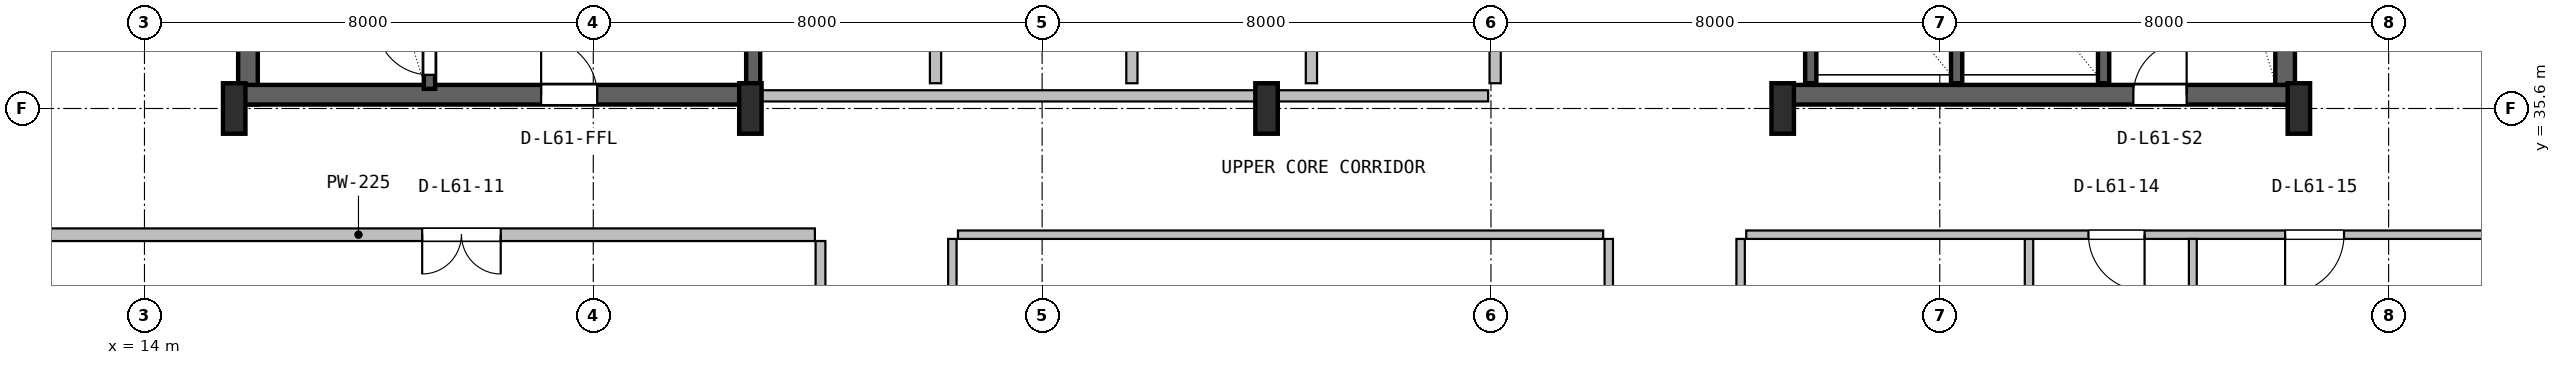
"""IFC4 building model, lengths in metres.
Left out: names, types, materials, properties, quantities, classifications, styles, units other than length and angle.
Written with IfcOpenShell. Run it as: python <this file> out.ifc"""

import sys

from ifc_helpers import new_model, si_unit, direction, frame, frame_2d, origin, origin_2d, place, context, subcontext, project, spatial, rectangle, i_section, extrude, source, transform, mapped, element, fill, save


model = new_model("IFC4")
c1 = context("Model", 3, precision=1e-05, world=origin(), true_north=direction((0.0, 1.0)))
c2 = subcontext(c1, "Body", "Model", "MODEL_VIEW")
j1 = project(units=[si_unit("LENGTHUNIT", "METRE"), si_unit("PLANEANGLEUNIT", "RADIAN")], contexts=[c1])
p1 = place(None, origin())
s1 = spatial("IfcSite", under=j1, at=p1, CompositionType="ELEMENT")
p2 = place(p1, origin())
s2 = spatial("IfcBuilding", under=s1, at=p2, CompositionType="ELEMENT")
p3 = place(p2, frame((0.0, 0.0, 247.0)))
s3 = spatial("IfcBuildingStorey", under=s2, at=p3, CompositionType="ELEMENT", Elevation=247.0)
for number, where, z_axis, x_axis in (
    (1, (15.845, 35.67, 0.0), (0.0, 0.0, 1.0), (0.0, 1.0, 0.0)),
    (2, (52.155, 35.67, 0.0), (0.0, 0.0, 1.0), (0.0, 1.0, 0.0)),
):
    element("IfcWall", number, at=place(p3, frame(where, z_axis=z_axis, x_axis=x_axis)), inside=s3, PredefinedType="SHEAR", context=c2, shape_type="SweptSolid", body=[
        extrude(rectangle(XDim=11.13, YDim=0.35, at=frame_2d((5.565, 0.0))), origin(), (0.0, 0.0, 1.0), 3.55),
    ])
p4 = place(p3, frame((15.67, 35.845, 0.0), z_axis=(0.0, 0.0, 1.0), x_axis=(1.0, 0.0, 0.0)))
e3 = element("IfcWall", 3, at=p4, inside=s3, PredefinedType="SHEAR", context=c2, shape_type="SweptSolid", body=[
    extrude(rectangle(XDim=9.13, YDim=0.35, at=frame_2d((4.565, 0.0))), origin(), (0.0, 0.0, 1.0), 3.55),
])
p5 = place(p4, frame((5.4, 0.0, 0.0)))
e4 = element("IfcOpeningElement", 4, at=p5, cuts=e3, PredefinedType="OPENING", context=c2, shape_type="SweptSolid", body=[
    extrude(rectangle(XDim=1.0, YDim=2.1, at=frame_2d((0.5, 1.05))), frame((0.0, 0.185, 0.0), z_axis=(0.0, -1.0, 0.0), x_axis=(1.0, 0.0, 0.0)), (0.0, 0.0, 1.0), 0.37),
])
p6 = place(p3, frame((43.2, 35.845, 0.0), z_axis=(0.0, 0.0, 1.0), x_axis=(1.0, 0.0, 0.0)))
e5 = element("IfcWall", 5, at=p6, inside=s3, PredefinedType="SHEAR", context=c2, shape_type="SweptSolid", body=[
    extrude(rectangle(XDim=9.13, YDim=0.35, at=frame_2d((4.565, 0.0))), origin(), (0.0, 0.0, 1.0), 3.55),
])
p7 = place(p6, frame((6.25, 0.0, 0.0)))
e6 = element("IfcOpeningElement", 6, at=p7, cuts=e5, PredefinedType="OPENING", context=c2, shape_type="SweptSolid", body=[
    extrude(rectangle(XDim=0.95, YDim=2.1, at=frame_2d((0.475, 1.05))), frame((0.0, 0.185, 0.0), z_axis=(0.0, -1.0, 0.0), x_axis=(1.0, 0.0, 0.0)), (0.0, 0.0, 1.0), 0.37),
])
m1 = source(origin(), c2, "Body", "SweptSolid", [
    extrude(i_section(OverallWidth=0.4, OverallDepth=0.9, WebThickness=0.016, FlangeThickness=0.028, FilletRadius=0.016, at=origin_2d()), origin(), (0.0, 0.0, 1.0), 3.8),
])
for number, where, z_axis, x_axis in (
    (7, (15.6, 35.6, 0.0), (0.0, 0.0, 1.0), (1.0, 0.0, 0.0)),
    (8, (24.8, 35.6, 0.0), (0.0, 0.0, 1.0), (1.0, 0.0, 0.0)),
    (9, (34.0, 35.6, 0.0), (0.0, 0.0, 1.0), (1.0, 0.0, 0.0)),
    (10, (43.2, 35.6, 0.0), (0.0, 0.0, 1.0), (1.0, 0.0, 0.0)),
    (11, (52.4, 35.6, 0.0), (0.0, 0.0, 1.0), (1.0, 0.0, 0.0)),
):
    element("IfcColumn", number, at=place(p3, frame(where, z_axis=z_axis, x_axis=x_axis)), inside=s3, PredefinedType="COLUMN", context=c2, shape_type="MappedRepresentation", body=[
        mapped(m1, transform((0.0, 0.0, 0.0), x_axis=(1.0, 0.0, 0.0), y_axis=(0.0, 1.0, 0.0), z_axis=(0.0, 0.0, 1.0), scale=1.0)),
    ])
p8 = place(p3, frame((19.08, 35.95, 0.0), z_axis=(0.0, 0.0, 1.0), x_axis=(0.0, 1.0, 0.0)))
e12 = element("IfcWall", 12, at=p8, inside=s3, PredefinedType="SHEAR", context=c2, shape_type="SweptSolid", body=[
    extrude(rectangle(XDim=9.65, YDim=0.2, at=frame_2d((4.825, 0.0))), origin(), (0.0, 0.0, 1.0), 3.55),
])
p9 = place(p8, frame((0.25, 0.0, 0.0)))
e13 = element("IfcOpeningElement", 13, at=p9, cuts=e12, PredefinedType="OPENING", context=c2, shape_type="SweptSolid", body=[
    extrude(rectangle(XDim=0.95, YDim=2.1, at=frame_2d((0.475, 1.05))), frame((0.0, 0.11, 0.0), z_axis=(0.0, -1.0, 0.0), x_axis=(1.0, 0.0, 0.0)), (0.0, 0.0, 1.0), 0.22),
])
p10 = place(p3, frame((24.85, 36.05, 0.0), z_axis=(0.0, 0.0, 1.0), x_axis=(0.0, 1.0, 0.0)))
e14 = element("IfcWall", 14, at=p10, inside=s3, PredefinedType="SHEAR", context=c2, shape_type="SweptSolid", body=[
    extrude(rectangle(XDim=10.45, YDim=0.25, at=frame_2d((5.225, 0.0))), origin(), (0.0, 0.0, 1.0), 3.55),
])
p11 = place(p3, frame((48.92, 36.05, 0.0), z_axis=(0.0, 0.0, 1.0), x_axis=(0.0, 1.0, 0.0)))
e15 = element("IfcWall", 15, at=p11, inside=s3, PredefinedType="SHEAR", context=c2, shape_type="SweptSolid", body=[
    extrude(rectangle(XDim=10.5, YDim=0.2, at=frame_2d((5.25, 0.0))), origin(), (0.0, 0.0, 1.0), 3.55),
])
for number, where, z_axis, x_axis in (
    (16, (43.7, 36.05, 0.0), (0.0, 0.0, 1.0), (0.0, 1.0, 0.0)),
    (17, (46.3, 36.05, 0.0), (0.0, 0.0, 1.0), (0.0, 1.0, 0.0)),
):
    element("IfcWall", number, at=place(p3, frame(where, z_axis=z_axis, x_axis=x_axis)), inside=s3, PredefinedType="SHEAR", context=c2, shape_type="SweptSolid", body=[
        extrude(rectangle(XDim=3.05, YDim=0.2, at=frame_2d((1.525, 0.0))), origin(), (0.0, 0.0, 1.0), 3.55),
    ])
p12 = place(p3, frame((25.0, 35.825, 0.0), z_axis=(0.0, 0.0, 1.0), x_axis=(1.0, 0.0, 0.0)))
e18 = element("IfcWall", 18, at=p12, inside=s3, PredefinedType="SOLIDWALL", context=c2, shape_type="SweptSolid", body=[
    extrude(rectangle(XDim=12.95, YDim=0.2, at=frame_2d((6.475, 0.0))), origin(), (0.0, 0.0, 1.0), 2.575),
])
for number, where, z_axis, x_axis in (
    (19, (28.1, 36.05, 0.0), (0.0, 0.0, 1.0), (0.0, 1.0, 0.0)),
    (20, (31.6, 36.05, 0.0), (0.0, 0.0, 1.0), (0.0, 1.0, 0.0)),
):
    element("IfcWall", number, at=place(p3, frame(where, z_axis=z_axis, x_axis=x_axis)), inside=s3, PredefinedType="PLUMBINGWALL", context=c2, shape_type="SweptSolid", body=[
        extrude(rectangle(XDim=3.1, YDim=0.2, at=frame_2d((1.55, 0.0))), origin(), (0.0, 0.0, 1.0), 3.53),
    ])
for number, where, z_axis, x_axis in (
    (21, (34.8, 36.05, 0.0), (0.0, 0.0, 1.0), (0.0, 1.0, 0.0)),
    (22, (38.075, 36.05, 0.0), (0.0, 0.0, 1.0), (0.0, 1.0, 0.0)),
):
    element("IfcWall", number, at=place(p3, frame(where, z_axis=z_axis, x_axis=x_axis)), inside=s3, PredefinedType="SOLIDWALL", context=c2, shape_type="SweptSolid", body=[
        extrude(rectangle(XDim=3.1, YDim=0.2, at=frame_2d((1.55, 0.0))), origin(), (0.0, 0.0, 1.0), 3.53),
    ])
p13 = place(p3, frame((26.05, 22.235, 0.0), z_axis=(0.0, 0.0, 1.0), x_axis=(0.0, 1.0, 0.0)))
e23 = element("IfcWall", 23, at=p13, inside=s3, PredefinedType="PARTITIONING", context=c2, shape_type="SweptSolid", body=[
    extrude(rectangle(XDim=11.003, YDim=0.175, at=frame_2d((5.501, 0.0))), origin(), (0.0, 0.0, 1.0), 2.908),
])
p14 = place(p13, frame((0.3, 0.0, 0.0)))
e24 = element("IfcOpeningElement", 24, at=p14, cuts=e23, PredefinedType="OPENING", context=c2, shape_type="SweptSolid", body=[
    extrude(rectangle(XDim=1.05, YDim=2.1, at=frame_2d((0.525, 1.05))), frame((0.0, 0.098, 0.0), z_axis=(0.0, -1.0, 0.0), x_axis=(1.0, 0.0, 0.0)), (0.0, 0.0, 1.0), 0.195),
])
p15 = place(p13, frame((3.91, 0.0, 0.0)))
e25 = element("IfcOpeningElement", 25, at=p15, cuts=e23, PredefinedType="OPENING", context=c2, shape_type="SweptSolid", body=[
    extrude(rectangle(XDim=1.05, YDim=2.1, at=frame_2d((0.525, 1.05))), frame((0.0, 0.098, 0.0), z_axis=(0.0, -1.0, 0.0), x_axis=(1.0, 0.0, 0.0)), (0.0, 0.0, 1.0), 0.195),
])
p16 = place(p3, frame((9.68, 33.35, 0.0), z_axis=(0.0, 0.0, 1.0), x_axis=(1.0, 0.0, 0.0)))
e26 = element("IfcWall", 26, at=p16, inside=s3, PredefinedType="PARTITIONING", context=c2, shape_type="SweptSolid", body=[
    extrude(rectangle(XDim=16.27, YDim=0.225, at=frame_2d((8.135, 0.0))), origin(), (0.0, 0.0, 1.0), 2.908),
])
p17 = place(p16, frame((9.27, 0.0, 0.0)))
e27 = element("IfcOpeningElement", 27, at=p17, cuts=e26, PredefinedType="OPENING", context=c2, shape_type="SweptSolid", body=[
    extrude(rectangle(XDim=1.4, YDim=2.12, at=frame_2d((0.7, 1.06))), frame((0.0, 0.123, 0.0), z_axis=(0.0, -1.0, 0.0), x_axis=(1.0, 0.0, 0.0)), (0.0, 0.0, 1.0), 0.245),
])
p18 = place(p3, frame((40.1, 24.585, 0.0), z_axis=(0.0, 0.0, 1.0), x_axis=(0.0, 1.0, 0.0)))
e28 = element("IfcWall", 28, at=p18, inside=s3, PredefinedType="PARTITIONING", context=c2, shape_type="SweptSolid", body=[
    extrude(rectangle(XDim=8.69, YDim=0.15, at=frame_2d((4.345, 0.0))), origin(), (0.0, 0.0, 1.0), 3.222),
])
p19 = place(p3, frame((28.5, 33.35, 0.0), z_axis=(0.0, 0.0, 1.0), x_axis=(1.0, 0.0, 0.0)))
e29 = element("IfcWall", 29, at=p19, inside=s3, PredefinedType="PARTITIONING", context=c2, shape_type="SweptSolid", body=[
    extrude(rectangle(XDim=11.5, YDim=0.15, at=frame_2d((5.75, 0.0))), origin(), (0.0, 0.0, 1.0), 2.908),
])
p20 = place(p3, frame((28.4, 24.585, 0.0), z_axis=(0.0, 0.0, 1.0), x_axis=(0.0, 1.0, 0.0)))
e30 = element("IfcWall", 30, at=p20, inside=s3, PredefinedType="PARTITIONING", context=c2, shape_type="SweptSolid", body=[
    extrude(rectangle(XDim=8.69, YDim=0.15, at=frame_2d((4.345, 0.0))), origin(), (0.0, 0.0, 1.0), 3.222),
])
p21 = place(p3, frame((47.59, 22.235, 0.0), z_axis=(0.0, 0.0, 1.0), x_axis=(0.0, 1.0, 0.0)))
e31 = element("IfcWall", 31, at=p21, inside=s3, PredefinedType="PARTITIONING", context=c2, shape_type="SweptSolid", body=[
    extrude(rectangle(XDim=11.04, YDim=0.15, at=frame_2d((5.52, 0.0))), origin(), (0.0, 0.0, 1.0), 3.222),
])
p22 = place(p3, frame((42.55, 33.35, 0.0), z_axis=(0.0, 0.0, 1.0), x_axis=(1.0, 0.0, 0.0)))
e32 = element("IfcWall", 32, at=p22, inside=s3, PredefinedType="PARTITIONING", context=c2, shape_type="SweptSolid", body=[
    extrude(rectangle(XDim=15.77, YDim=0.15, at=frame_2d((7.885, 0.0))), origin(), (0.0, 0.0, 1.0), 2.908),
])
p23 = place(p22, frame((6.1, 0.0, 0.0)))
e33 = element("IfcOpeningElement", 33, at=p23, cuts=e32, PredefinedType="OPENING", context=c2, shape_type="SweptSolid", body=[
    extrude(rectangle(XDim=1.0, YDim=2.1, at=frame_2d((0.5, 1.05))), frame((0.0, 0.085, 0.0), z_axis=(0.0, -1.0, 0.0), x_axis=(1.0, 0.0, 0.0)), (0.0, 0.0, 1.0), 0.17),
])
p24 = place(p22, frame((9.605, 0.0, 0.0)))
e34 = element("IfcOpeningElement", 34, at=p24, cuts=e32, PredefinedType="OPENING", context=c2, shape_type="SweptSolid", body=[
    extrude(rectangle(XDim=1.05, YDim=2.1, at=frame_2d((0.525, 1.05))), frame((0.0, 0.085, 0.0), z_axis=(0.0, -1.0, 0.0), x_axis=(1.0, 0.0, 0.0)), (0.0, 0.0, 1.0), 0.17),
])
p25 = place(p3, frame((42.45, 22.235, 0.0), z_axis=(0.0, 0.0, 1.0), x_axis=(0.0, 1.0, 0.0)))
e35 = element("IfcWall", 35, at=p25, inside=s3, PredefinedType="PARTITIONING", context=c2, shape_type="SweptSolid", body=[
    extrude(rectangle(XDim=11.04, YDim=0.15, at=frame_2d((5.52, 0.0))), origin(), (0.0, 0.0, 1.0), 2.908),
])
p26 = place(p25, frame((5.06, 0.0, 0.0)))
e36 = element("IfcOpeningElement", 36, at=p26, cuts=e35, PredefinedType="OPENING", context=c2, shape_type="SweptSolid", body=[
    extrude(rectangle(XDim=0.92, YDim=2.08, at=frame_2d((0.46, 1.04))), frame((0.0, 0.085, 0.0), z_axis=(0.0, -1.0, 0.0), x_axis=(1.0, 0.0, 0.0)), (0.0, 0.0, 1.0), 0.17),
])
p27 = place(p3, frame((50.51, 22.235, 0.0), z_axis=(0.0, 0.0, 1.0), x_axis=(0.0, 1.0, 0.0)))
e37 = element("IfcWall", 37, at=p27, inside=s3, PredefinedType="PARTITIONING", context=c2, shape_type="SweptSolid", body=[
    extrude(rectangle(XDim=11.04, YDim=0.14, at=frame_2d((5.52, 0.0))), origin(), (0.0, 0.0, 1.0), 3.222),
])
m2 = source(origin(), c2, "Body", "SweptSolid", [
    extrude(rectangle(XDim=0.95, YDim=2.1, at=frame_2d((0.475, 1.05))), frame((0.0, 0.025, 0.0), z_axis=(0.0, -1.0, 0.0), x_axis=(1.0, 0.0, 0.0)), (0.0, 0.0, 1.0), 0.05),
])
p28 = place(p9, origin())
e38 = element("IfcDoor", 38, at=p28, inside=s3, OperationType="SINGLE_SWING_RIGHT", PredefinedType="DOOR", context=c2, shape_type="MappedRepresentation", body=[
    mapped(m2, transform((0.0, 0.0, 0.0), x_axis=(1.0, 0.0, 0.0), y_axis=(0.0, 1.0, 0.0), z_axis=(0.0, 0.0, 1.0), scale=1.0)),
])
fill(e13, e38)
m3 = source(origin(), c2, "Body", "SweptSolid", [
    extrude(rectangle(XDim=1.0, YDim=2.1, at=frame_2d((0.5, 1.05))), frame((0.0, 0.025, 0.0), z_axis=(0.0, -1.0, 0.0), x_axis=(1.0, 0.0, 0.0)), (0.0, 0.0, 1.0), 0.05),
])
p29 = place(p5, origin())
e39 = element("IfcDoor", 39, at=p29, inside=s3, OperationType="SINGLE_SWING_LEFT", PredefinedType="DOOR", context=c2, shape_type="MappedRepresentation", body=[
    mapped(m3, transform((0.0, 0.0, 0.0), x_axis=(1.0, 0.0, 0.0), y_axis=(0.0, 1.0, 0.0), z_axis=(0.0, 0.0, 1.0), scale=1.0)),
])
fill(e4, e39)
p30 = place(p7, origin())
e40 = element("IfcDoor", 40, at=p30, inside=s3, OperationType="SINGLE_SWING_RIGHT", PredefinedType="DOOR", context=c2, shape_type="MappedRepresentation", body=[
    mapped(m2, transform((0.0, 0.0, 0.0), x_axis=(1.0, 0.0, 0.0), y_axis=(0.0, 1.0, 0.0), z_axis=(0.0, 0.0, 1.0), scale=1.0)),
])
fill(e6, e40)
m4 = source(origin(), c2, "Body", "SweptSolid", [
    extrude(rectangle(XDim=1.4, YDim=2.12, at=frame_2d((0.7, 1.06))), frame((0.0, 0.025, 0.0), z_axis=(0.0, -1.0, 0.0), x_axis=(1.0, 0.0, 0.0)), (0.0, 0.0, 1.0), 0.05),
])
p31 = place(p17, frame((1.4, 0.0, 0.0), z_axis=(0.0, 0.0, 1.0), x_axis=(-1.0, 0.0, 0.0)))
e41 = element("IfcDoor", 41, at=p31, inside=s3, OperationType="DOUBLE_DOOR_SINGLE_SWING", PredefinedType="DOOR", context=c2, shape_type="MappedRepresentation", body=[
    mapped(m4, transform((0.0, 0.0, 0.0), x_axis=(1.0, 0.0, 0.0), y_axis=(0.0, 1.0, 0.0), z_axis=(0.0, 0.0, 1.0), scale=1.0)),
])
fill(e27, e41)
m5 = source(origin(), c2, "Body", "SweptSolid", [
    extrude(rectangle(XDim=1.0, YDim=2.1, at=frame_2d((0.5, 1.05))), frame((0.0, 0.025, 0.0), z_axis=(0.0, -1.0, 0.0), x_axis=(1.0, 0.0, 0.0)), (0.0, 0.0, 1.0), 0.05),
])
p32 = place(p23, frame((1.0, 0.0, 0.0), z_axis=(0.0, 0.0, 1.0), x_axis=(-1.0, 0.0, 0.0)))
e42 = element("IfcDoor", 42, at=p32, inside=s3, OperationType="SINGLE_SWING_RIGHT", PredefinedType="DOOR", context=c2, shape_type="MappedRepresentation", body=[
    mapped(m5, transform((0.0, 0.0, 0.0), x_axis=(1.0, 0.0, 0.0), y_axis=(0.0, 1.0, 0.0), z_axis=(0.0, 0.0, 1.0), scale=1.0)),
])
fill(e33, e42)
m6 = source(origin(), c2, "Body", "SweptSolid", [
    extrude(rectangle(XDim=1.05, YDim=2.1, at=frame_2d((0.525, 1.05))), frame((0.0, 0.025, 0.0), z_axis=(0.0, -1.0, 0.0), x_axis=(1.0, 0.0, 0.0)), (0.0, 0.0, 1.0), 0.05),
])
p33 = place(p24, frame((1.05, 0.0, 0.0), z_axis=(0.0, 0.0, 1.0), x_axis=(-1.0, 0.0, 0.0)))
e43 = element("IfcDoor", 43, at=p33, inside=s3, OperationType="SINGLE_SWING_LEFT", PredefinedType="DOOR", context=c2, shape_type="MappedRepresentation", body=[
    mapped(m6, transform((0.0, 0.0, 0.0), x_axis=(1.0, 0.0, 0.0), y_axis=(0.0, 1.0, 0.0), z_axis=(0.0, 0.0, 1.0), scale=1.0)),
])
fill(e34, e43)
save(model, sys.argv[1])
